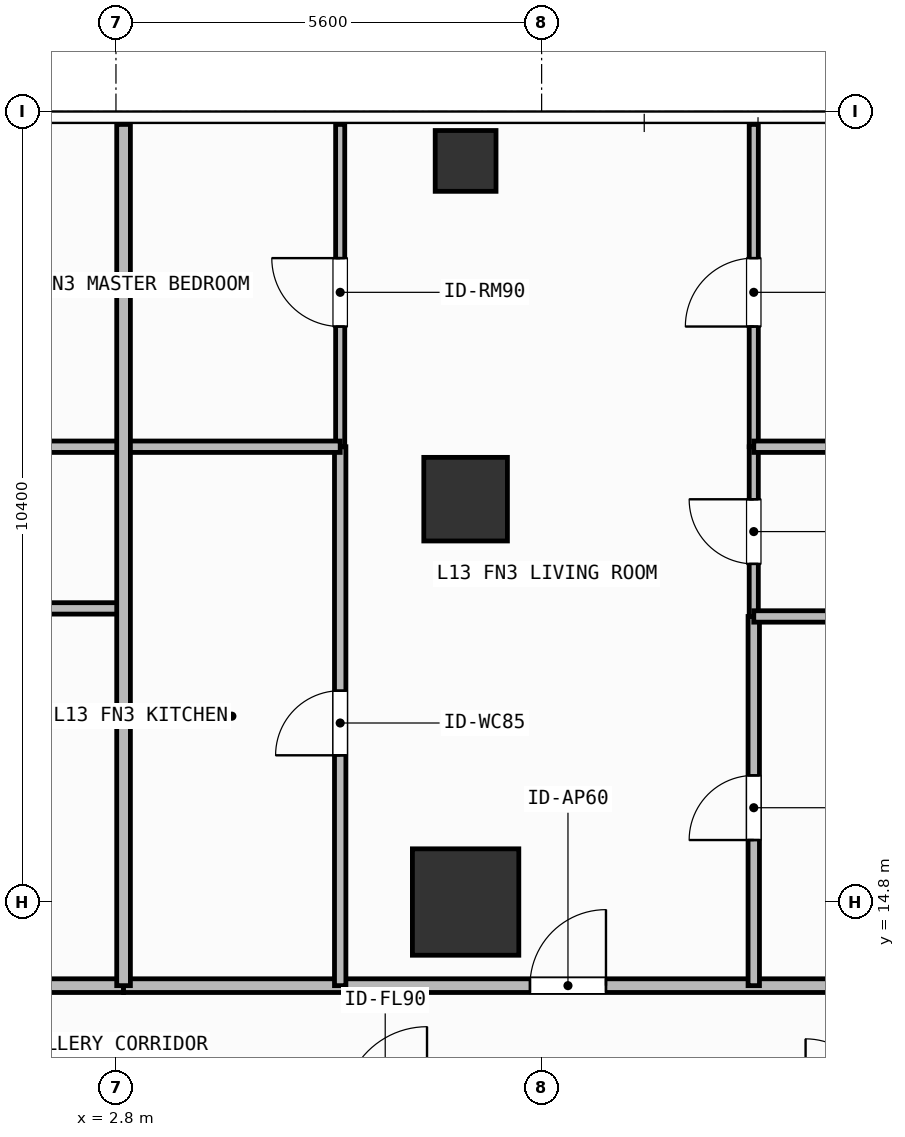
"""IFC4 building model, lengths in metres.
Left out: names, types, materials, properties, quantities, classifications, styles, units other than length and angle.
Written with IfcOpenShell. Run it as: python <this file> out.ifc"""

import sys

from ifc_helpers import new_model, si_unit, direction, frame, frame_2d, origin, origin_2d, place, context, subcontext, project, spatial, rectangle, hollow_rectangle, extrude, element, fill, save


model = new_model("IFC4")
c1 = context("Model", 3, precision=1e-05, world=origin(), true_north=direction((0.0, 1.0)))
c2 = subcontext(c1, "Body", "Model", "MODEL_VIEW")
j1 = project(units=[si_unit("LENGTHUNIT", "METRE"), si_unit("PLANEANGLEUNIT", "RADIAN")], contexts=[c1])
p1 = place(None, origin())
s1 = spatial("IfcSite", under=j1, at=p1, CompositionType="ELEMENT")
p2 = place(p1, origin())
s2 = spatial("IfcBuilding", under=s1, at=p2, CompositionType="ELEMENT")
p3 = place(p2, frame((0.0, 0.0, 50.1)))
s3 = spatial("IfcBuildingStorey", under=s2, at=p3, CompositionType="ELEMENT", Elevation=50.1)
p4 = place(p3, frame((7.4, 14.8, 0.0), z_axis=(0.0, 0.0, 1.0), x_axis=(1.0, 0.0, 0.0)))
e1 = element("IfcColumn", 1, at=p4, inside=s3, PredefinedType="COLUMN", context=c2, shape_type="SweptSolid", body=[
    extrude(rectangle(XDim=1.4, YDim=1.4, at=origin_2d()), origin(), (0.0, 0.0, 1.0), 3.9),
])
p5 = place(p3, frame((7.4, 20.1, 0.0), z_axis=(0.0, 0.0, 1.0), x_axis=(1.0, 0.0, 0.0)))
e2 = element("IfcColumn", 2, at=p5, inside=s3, PredefinedType="COLUMN", context=c2, shape_type="SweptSolid", body=[
    extrude(rectangle(XDim=1.1, YDim=1.1, at=origin_2d()), origin(), (0.0, 0.0, 1.0), 3.9),
])
p6 = place(p3, frame((7.4, 24.55, 0.0), z_axis=(0.0, 0.0, 1.0), x_axis=(1.0, 0.0, 0.0)))
e3 = element("IfcColumn", 3, at=p6, inside=s3, PredefinedType="COLUMN", context=c2, shape_type="SweptSolid", body=[
    extrude(hollow_rectangle(XDim=0.8, YDim=0.8, WallThickness=0.036, at=origin_2d()), origin(), (0.0, 0.0, 1.0), 3.9),
])
p7 = place(p3, frame((-9.151, 13.7, 0.0), z_axis=(0.0, 0.0, 1.0), x_axis=(1.0, 0.0, 0.0)))
e4 = element("IfcWall", 4, at=p7, inside=s3, PredefinedType="PARTITIONING", context=c2, shape_type="SweptSolid", body=[
    extrude(rectangle(XDim=12.051, YDim=0.18, at=frame_2d((6.025, 0.0))), origin(), (0.0, 0.0, 1.0), 3.62),
])
p8 = place(p7, frame((4.989, 0.0, 0.0)))
e5 = element("IfcOpeningElement", 5, at=p8, cuts=e4, PredefinedType="OPENING", context=c2, shape_type="SweptSolid", body=[
    extrude(rectangle(XDim=1.0, YDim=2.2, at=frame_2d((0.5, 1.1))), frame((0.0, 0.1, 0.0), z_axis=(0.0, -1.0, 0.0), x_axis=(1.0, 0.0, 0.0)), (0.0, 0.0, 1.0), 0.2),
])
p9 = place(p3, frame((2.9, 13.7, 0.0), z_axis=(0.0, 0.0, 1.0), x_axis=(1.0, 0.0, 0.0)))
e6 = element("IfcWall", 6, at=p9, inside=s3, PredefinedType="PARTITIONING", context=c2, shape_type="SweptSolid", body=[
    extrude(rectangle(XDim=12.051, YDim=0.18, at=frame_2d((6.025, 0.0))), origin(), (0.0, 0.0, 1.0), 3.62),
])
p10 = place(p9, frame((5.347, 0.0, 0.0)))
e7 = element("IfcOpeningElement", 7, at=p10, cuts=e6, PredefinedType="OPENING", context=c2, shape_type="SweptSolid", body=[
    extrude(rectangle(XDim=1.0, YDim=2.2, at=frame_2d((0.5, 1.1))), frame((0.0, 0.1, 0.0), z_axis=(0.0, -1.0, 0.0), x_axis=(1.0, 0.0, 0.0)), (0.0, 0.0, 1.0), 0.2),
])
p11 = place(p3, frame((5.75, 13.7, 0.0), z_axis=(0.0, 0.0, 1.0), x_axis=(0.0, 1.0, 0.0)))
e8 = element("IfcWall", 8, at=p11, inside=s3, PredefinedType="PARTITIONING", context=c2, shape_type="SweptSolid", body=[
    extrude(rectangle(XDim=7.09, YDim=0.15, at=frame_2d((3.545, 0.0))), origin(), (0.0, 0.0, 1.0), 3.62),
])
p12 = place(p11, frame((3.03, 0.0, 0.0)))
e9 = element("IfcOpeningElement", 9, at=p12, cuts=e8, PredefinedType="OPENING", context=c2, shape_type="SweptSolid", body=[
    extrude(rectangle(XDim=0.85, YDim=2.1, at=frame_2d((0.425, 1.05))), frame((0.0, 0.085, 0.0), z_axis=(0.0, -1.0, 0.0), x_axis=(1.0, 0.0, 0.0)), (0.0, 0.0, 1.0), 0.17),
])
p13 = place(p3, frame((5.75, 20.79, 0.0), z_axis=(0.0, 0.0, 1.0), x_axis=(0.0, 1.0, 0.0)))
e10 = element("IfcWall", 10, at=p13, inside=s3, PredefinedType="PARTITIONING", context=c2, shape_type="SweptSolid", body=[
    extrude(rectangle(XDim=4.24, YDim=0.12, at=frame_2d((2.12, 0.0))), origin(), (0.0, 0.0, 1.0), 3.62),
])
p14 = place(p13, frame((1.581, 0.0, 0.0)))
e11 = element("IfcOpeningElement", 11, at=p14, cuts=e10, PredefinedType="OPENING", context=c2, shape_type="SweptSolid", body=[
    extrude(rectangle(XDim=0.9, YDim=2.1, at=frame_2d((0.45, 1.05))), frame((0.0, 0.07, 0.0), z_axis=(0.0, -1.0, 0.0), x_axis=(1.0, 0.0, 0.0)), (0.0, 0.0, 1.0), 0.14),
])
p15 = place(p3, frame((11.191, 13.7, 0.0), z_axis=(0.0, 0.0, 1.0), x_axis=(0.0, 1.0, 0.0)))
e12 = element("IfcWall", 12, at=p15, inside=s3, PredefinedType="PARTITIONING", context=c2, shape_type="SweptSolid", body=[
    extrude(rectangle(XDim=4.857, YDim=0.15, at=frame_2d((2.428, 0.0))), origin(), (0.0, 0.0, 1.0), 3.62),
])
p16 = place(p15, frame((1.916, 0.0, 0.0)))
e13 = element("IfcOpeningElement", 13, at=p16, cuts=e12, PredefinedType="OPENING", context=c2, shape_type="SweptSolid", body=[
    extrude(rectangle(XDim=0.85, YDim=2.1, at=frame_2d((0.425, 1.05))), frame((0.0, 0.085, 0.0), z_axis=(0.0, -1.0, 0.0), x_axis=(1.0, 0.0, 0.0)), (0.0, 0.0, 1.0), 0.17),
])
p17 = place(p3, frame((11.191, 18.557, 0.0), z_axis=(0.0, 0.0, 1.0), x_axis=(0.0, 1.0, 0.0)))
e14 = element("IfcWall", 14, at=p17, inside=s3, PredefinedType="PARTITIONING", context=c2, shape_type="SweptSolid", body=[
    extrude(rectangle(XDim=2.233, YDim=0.12, at=frame_2d((1.117, 0.0))), origin(), (0.0, 0.0, 1.0), 3.31),
])
p18 = place(p17, frame((0.691, 0.0, 0.0)))
e15 = element("IfcOpeningElement", 15, at=p18, cuts=e14, PredefinedType="OPENING", context=c2, shape_type="SweptSolid", body=[
    extrude(rectangle(XDim=0.85, YDim=2.1, at=frame_2d((0.425, 1.05))), frame((0.0, 0.07, 0.0), z_axis=(0.0, -1.0, 0.0), x_axis=(1.0, 0.0, 0.0)), (0.0, 0.0, 1.0), 0.14),
])
p19 = place(p3, frame((11.191, 20.79, 0.0), z_axis=(0.0, 0.0, 1.0), x_axis=(0.0, 1.0, 0.0)))
e16 = element("IfcWall", 16, at=p19, inside=s3, PredefinedType="PARTITIONING", context=c2, shape_type="SweptSolid", body=[
    extrude(rectangle(XDim=4.24, YDim=0.12, at=frame_2d((2.12, 0.0))), origin(), (0.0, 0.0, 1.0), 3.31),
])
p20 = place(p19, frame((1.581, 0.0, 0.0)))
e17 = element("IfcOpeningElement", 17, at=p20, cuts=e16, PredefinedType="OPENING", context=c2, shape_type="SweptSolid", body=[
    extrude(rectangle(XDim=0.9, YDim=2.1, at=frame_2d((0.45, 1.05))), frame((0.0, 0.07, 0.0), z_axis=(0.0, -1.0, 0.0), x_axis=(1.0, 0.0, 0.0)), (0.0, 0.0, 1.0), 0.14),
])
for number, where, z_axis, x_axis in (
    (18, (-1.92, 18.663, 0.0), (0.0, 0.0, 1.0), (1.0, 0.0, 0.0)),
    (19, (-1.92, 20.79, 0.0), (0.0, 0.0, 1.0), (1.0, 0.0, 0.0)),
):
    element("IfcWall", number, at=place(p3, frame(where, z_axis=z_axis, x_axis=x_axis)), inside=s3, PredefinedType="PARTITIONING", context=c2, shape_type="SweptSolid", body=[
        extrude(rectangle(XDim=4.82, YDim=0.15, at=frame_2d((2.41, 0.0))), origin(), (0.0, 0.0, 1.0), 3.62),
    ])
p21 = place(p3, frame((2.9, 20.79, 0.0), z_axis=(0.0, 0.0, 1.0), x_axis=(1.0, 0.0, 0.0)))
e20 = element("IfcWall", 20, at=p21, inside=s3, PredefinedType="PARTITIONING", context=c2, shape_type="SweptSolid", body=[
    extrude(rectangle(XDim=2.85, YDim=0.15, at=frame_2d((1.425, 0.0))), origin(), (0.0, 0.0, 1.0), 3.62),
])
for number, where, z_axis, x_axis in (
    (21, (11.191, 18.557, 0.0), (0.0, 0.0, 1.0), (1.0, 0.0, 0.0)),
    (22, (11.191, 20.79, 0.0), (0.0, 0.0, 1.0), (1.0, 0.0, 0.0)),
):
    element("IfcWall", number, at=place(p3, frame(where, z_axis=z_axis, x_axis=x_axis)), inside=s3, PredefinedType="PARTITIONING", context=c2, shape_type="SweptSolid", body=[
        extrude(rectangle(XDim=3.76, YDim=0.15, at=frame_2d((1.88, 0.0))), origin(), (0.0, 0.0, 1.0), 3.62),
    ])
p22 = place(p3, frame((2.9, 13.7, 0.0), z_axis=(0.0, 0.0, 1.0), x_axis=(0.0, 1.0, 0.0)))
e23 = element("IfcWall", 23, at=p22, inside=s3, PredefinedType="PARTITIONING", context=c2, shape_type="SweptSolid", body=[
    extrude(rectangle(XDim=11.33, YDim=0.18, at=frame_2d((5.665, 0.0))), origin(), (0.0, 0.0, 1.0), 3.62),
])
p23 = place(p10, origin())
e24 = element("IfcDoor", 24, at=p23, inside=s3, OperationType="SINGLE_SWING_RIGHT", PredefinedType="DOOR", context=c2, shape_type="SweptSolid", body=[
    extrude(rectangle(XDim=1.0, YDim=2.2, at=frame_2d((0.5, 1.1))), frame((0.0, 0.025, 0.0), z_axis=(0.0, -1.0, 0.0), x_axis=(1.0, 0.0, 0.0)), (0.0, 0.0, 1.0), 0.05),
])
fill(e7, e24)
p24 = place(p12, origin())
e25 = element("IfcDoor", 25, at=p24, inside=s3, OperationType="SINGLE_SWING_LEFT", PredefinedType="DOOR", context=c2, shape_type="SweptSolid", body=[
    extrude(rectangle(XDim=0.85, YDim=2.1, at=frame_2d((0.425, 1.05))), frame((0.0, 0.025, 0.0), z_axis=(0.0, -1.0, 0.0), x_axis=(1.0, 0.0, 0.0)), (0.0, 0.0, 1.0), 0.05),
])
fill(e9, e25)
p25 = place(p14, origin())
e26 = element("IfcDoor", 26, at=p25, inside=s3, OperationType="SINGLE_SWING_RIGHT", PredefinedType="DOOR", context=c2, shape_type="SweptSolid", body=[
    extrude(rectangle(XDim=0.9, YDim=2.1, at=frame_2d((0.45, 1.05))), frame((0.0, 0.025, 0.0), z_axis=(0.0, -1.0, 0.0), x_axis=(1.0, 0.0, 0.0)), (0.0, 0.0, 1.0), 0.05),
])
fill(e11, e26)
p26 = place(p16, origin())
e27 = element("IfcDoor", 27, at=p26, inside=s3, OperationType="SINGLE_SWING_LEFT", PredefinedType="DOOR", context=c2, shape_type="SweptSolid", body=[
    extrude(rectangle(XDim=0.85, YDim=2.1, at=frame_2d((0.425, 1.05))), frame((0.0, 0.025, 0.0), z_axis=(0.0, -1.0, 0.0), x_axis=(1.0, 0.0, 0.0)), (0.0, 0.0, 1.0), 0.05),
])
fill(e13, e27)
p27 = place(p18, origin())
e28 = element("IfcDoor", 28, at=p27, inside=s3, OperationType="SINGLE_SWING_RIGHT", PredefinedType="DOOR", context=c2, shape_type="SweptSolid", body=[
    extrude(rectangle(XDim=0.85, YDim=2.1, at=frame_2d((0.425, 1.05))), frame((0.0, 0.025, 0.0), z_axis=(0.0, -1.0, 0.0), x_axis=(1.0, 0.0, 0.0)), (0.0, 0.0, 1.0), 0.05),
])
fill(e15, e28)
p28 = place(p20, origin())
e29 = element("IfcDoor", 29, at=p28, inside=s3, OperationType="SINGLE_SWING_LEFT", PredefinedType="DOOR", context=c2, shape_type="SweptSolid", body=[
    extrude(rectangle(XDim=0.9, YDim=2.1, at=frame_2d((0.45, 1.05))), frame((0.0, 0.025, 0.0), z_axis=(0.0, -1.0, 0.0), x_axis=(1.0, 0.0, 0.0)), (0.0, 0.0, 1.0), 0.05),
])
fill(e17, e29)
save(model, sys.argv[1])
